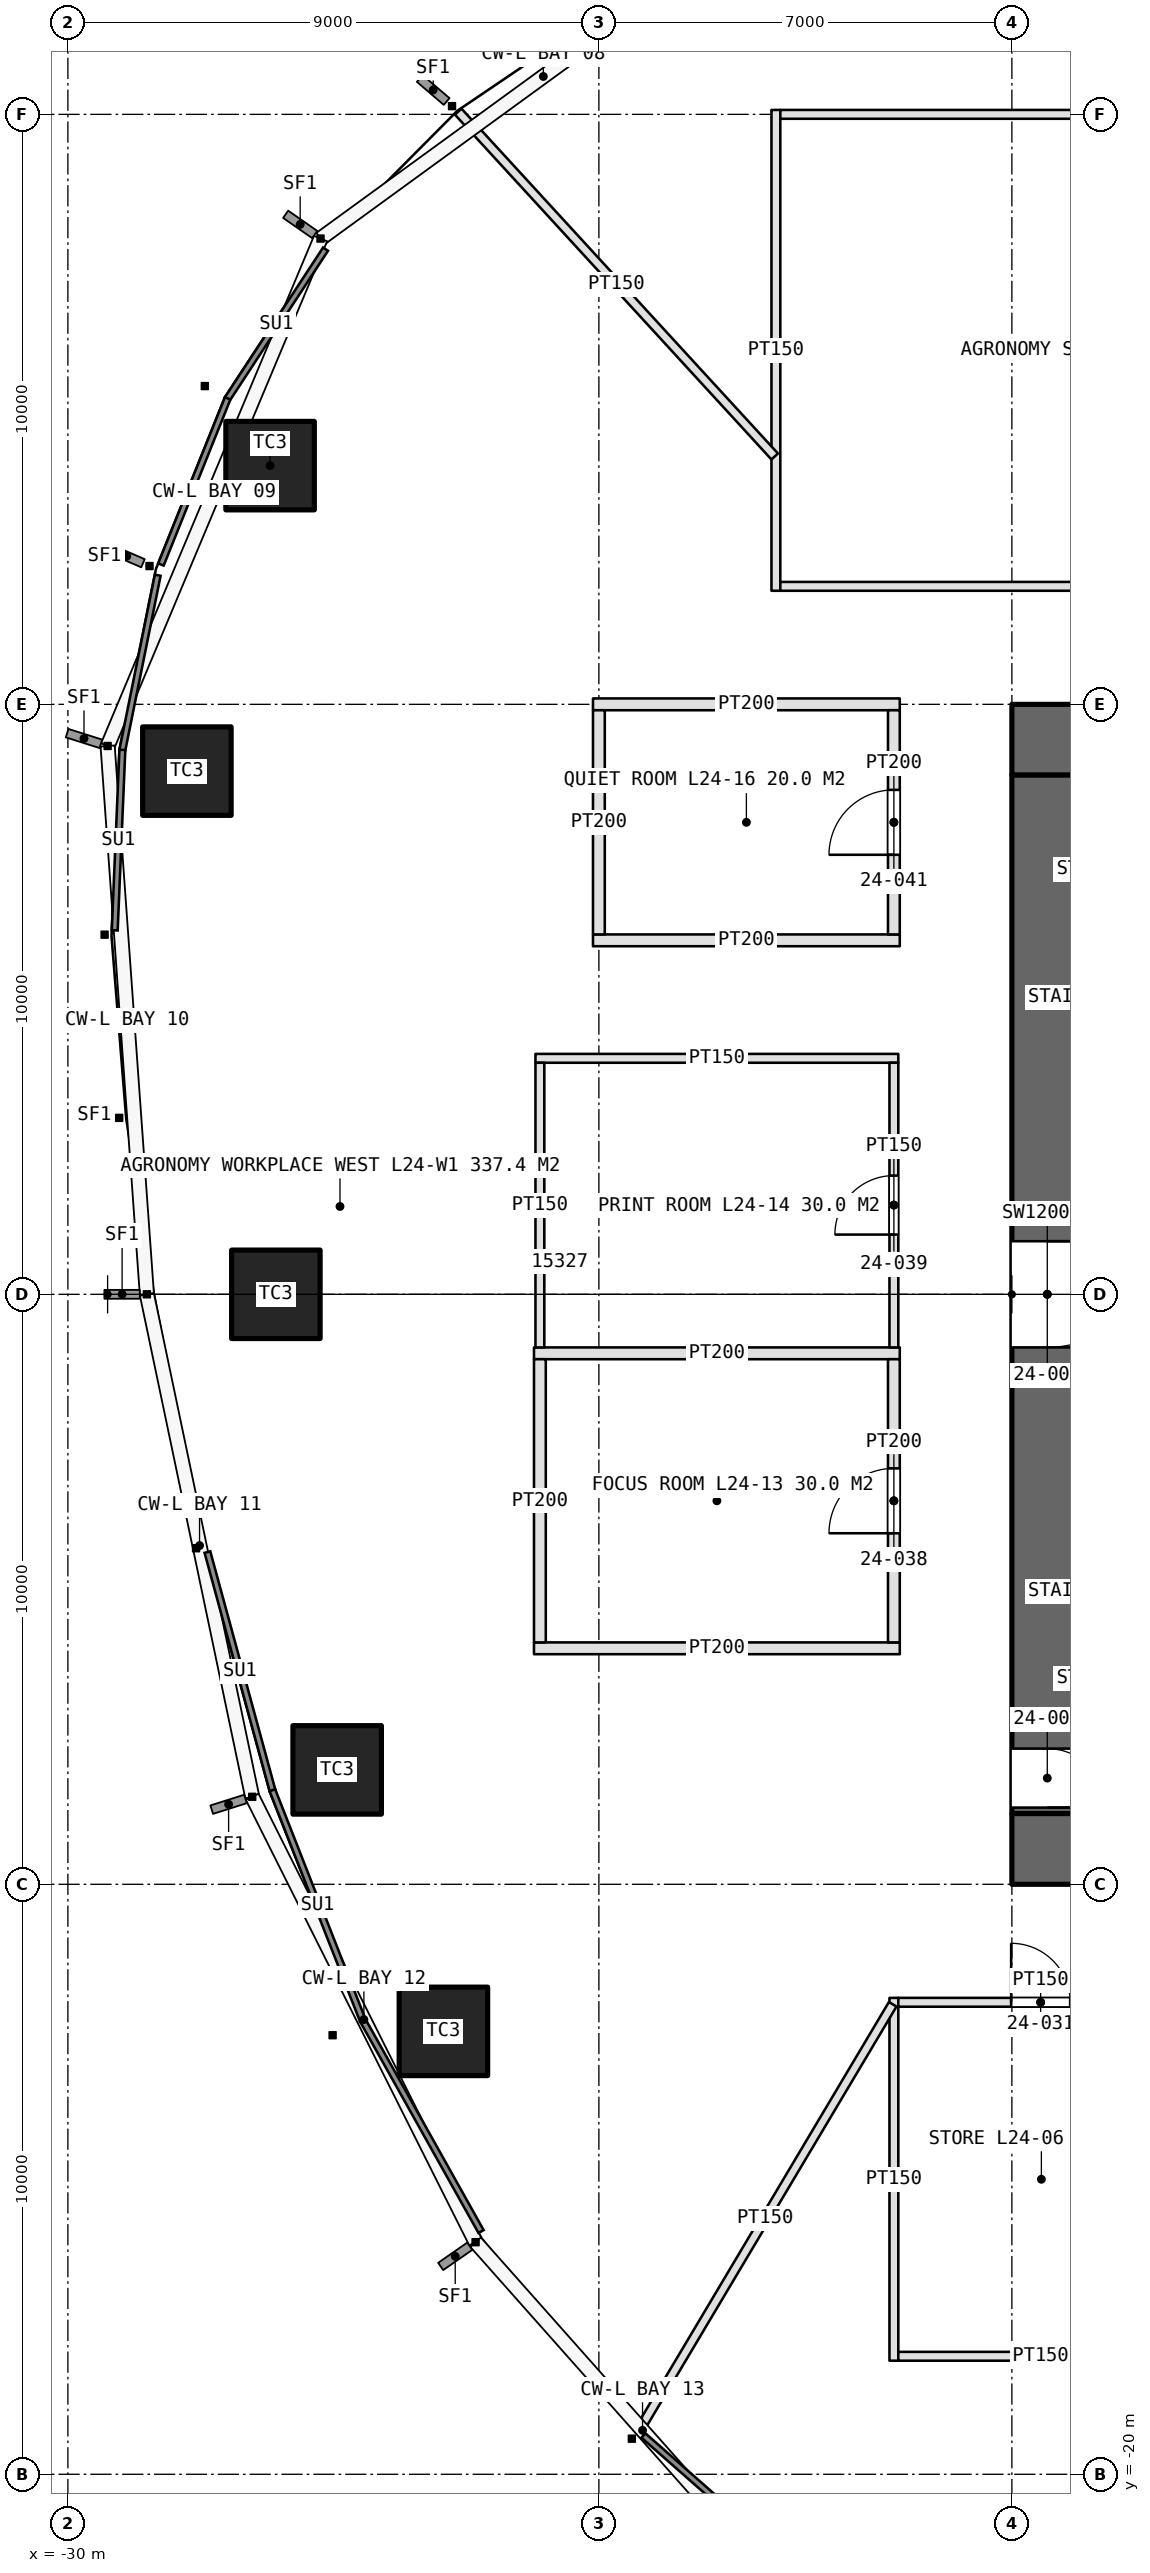
"""IFC4 building model, lengths in metres.
Left out: names, types, materials, properties, quantities, classifications, styles, units other than length and angle.
Written with IfcOpenShell. Run it as: python <this file> out.ifc"""

import sys

from ifc_helpers import new_model, si_unit, direction, frame, frame_2d, origin, origin_2d, place, context, subcontext, project, spatial, rectangle, extrude, element, fill, save


model = new_model("IFC4")
c1 = context("Model", 3, precision=1e-05, world=origin(), true_north=direction((0.0, 1.0)))
c2 = subcontext(c1, "Body", "Model", "MODEL_VIEW")
j1 = project(units=[si_unit("LENGTHUNIT", "METRE"), si_unit("PLANEANGLEUNIT", "RADIAN")], contexts=[c1])
p1 = place(None, origin())
s1 = spatial("IfcSite", under=j1, at=p1, CompositionType="ELEMENT")
p2 = place(p1, origin())
s2 = spatial("IfcBuilding", under=s1, at=p2, CompositionType="ELEMENT")
p3 = place(p2, frame((0.0, 0.0, 117.6)))
s3 = spatial("IfcBuildingStorey", under=s2, at=p3, CompositionType="ELEMENT", Elevation=117.6)
p4 = place(p3, frame((-14.0, -9.4, 0.0), z_axis=(0.0, 0.0, 1.0), x_axis=(1.0, 0.0, 0.0)))
e1 = element("IfcWall", 1, at=p4, inside=s3, PredefinedType="SHEAR", context=c2, shape_type="SweptSolid", body=[
    extrude(rectangle(XDim=28.0, YDim=1.2, at=frame_2d((14.0, 0.0))), origin(), (0.0, 0.0, 1.0), 4.2),
])
p5 = place(p4, frame((13.1, 0.0, 0.0)))
e2 = element("IfcOpeningElement", 2, at=p5, cuts=e1, PredefinedType="OPENING", context=c2, shape_type="SweptSolid", body=[
    extrude(rectangle(XDim=1.8, YDim=2.4, at=frame_2d((0.9, 1.2))), frame((0.0, 0.61, 0.0), z_axis=(0.0, -1.0, 0.0), x_axis=(1.0, 0.0, 0.0)), (0.0, 0.0, 1.0), 1.22),
])
p6 = place(p4, frame((22.9, 0.0, 0.0)))
e3 = element("IfcOpeningElement", 3, at=p6, cuts=e1, PredefinedType="OPENING", context=c2, shape_type="SweptSolid", body=[
    extrude(rectangle(XDim=2.2, YDim=2.7, at=frame_2d((1.1, 1.35))), frame((0.0, 0.61, 0.0), z_axis=(0.0, -1.0, 0.0), x_axis=(1.0, 0.0, 0.0)), (0.0, 0.0, 1.0), 1.22),
])
p7 = place(p3, frame((14.0, 9.4, 0.0), z_axis=(0.0, 0.0, 1.0), x_axis=(-1.0, 0.0, 0.0)))
e4 = element("IfcWall", 4, at=p7, inside=s3, PredefinedType="SHEAR", context=c2, shape_type="SweptSolid", body=[
    extrude(rectangle(XDim=28.0, YDim=1.2, at=frame_2d((14.0, 0.0))), origin(), (0.0, 0.0, 1.0), 4.2),
])
p8 = place(p7, frame((24.0, 0.0, 0.0)))
e5 = element("IfcOpeningElement", 5, at=p8, cuts=e4, PredefinedType="OPENING", context=c2, shape_type="SweptSolid", body=[
    extrude(rectangle(XDim=1.0, YDim=2.4, at=frame_2d((0.5, 1.2))), frame((0.0, 0.61, 0.0), z_axis=(0.0, -1.0, 0.0), x_axis=(1.0, 0.0, 0.0)), (0.0, 0.0, 1.0), 1.22),
])
p9 = place(p7, frame((13.1, 0.0, 0.0)))
e6 = element("IfcOpeningElement", 6, at=p9, cuts=e4, PredefinedType="OPENING", context=c2, shape_type="SweptSolid", body=[
    extrude(rectangle(XDim=1.8, YDim=2.4, at=frame_2d((0.9, 1.2))), frame((0.0, 0.61, 0.0), z_axis=(0.0, -1.0, 0.0), x_axis=(1.0, 0.0, 0.0)), (0.0, 0.0, 1.0), 1.22),
])
p10 = place(p3, frame((-13.4, 8.8, 0.0), z_axis=(0.0, 0.0, 1.0), x_axis=(0.0, -1.0, 0.0)))
e7 = element("IfcWall", 7, at=p10, inside=s3, PredefinedType="SHEAR", context=c2, shape_type="SweptSolid", body=[
    extrude(rectangle(XDim=17.6, YDim=1.2, at=frame_2d((8.8, 0.0))), origin(), (0.0, 0.0, 1.0), 4.2),
])
p11 = place(p10, frame((7.9, 0.0, 0.0)))
e8 = element("IfcOpeningElement", 8, at=p11, cuts=e7, PredefinedType="OPENING", context=c2, shape_type="SweptSolid", body=[
    extrude(rectangle(XDim=1.8, YDim=2.4, at=frame_2d((0.9, 1.2))), frame((0.0, 0.61, 0.0), z_axis=(0.0, -1.0, 0.0), x_axis=(1.0, 0.0, 0.0)), (0.0, 0.0, 1.0), 1.22),
])
p12 = place(p10, frame((16.5, 0.0, 0.0)))
e9 = element("IfcOpeningElement", 9, at=p12, cuts=e7, PredefinedType="OPENING", context=c2, shape_type="SweptSolid", body=[
    extrude(rectangle(XDim=1.0, YDim=2.4, at=frame_2d((0.5, 1.2))), frame((0.0, 0.61, 0.0), z_axis=(0.0, -1.0, 0.0), x_axis=(1.0, 0.0, 0.0)), (0.0, 0.0, 1.0), 1.22),
])
for number, where, z_axis, x_axis in (
    (10, (-26.573, 14.046, 0.0), (0.0, 0.0, 1.0), (1.0, 0.0, 0.0)),
    (11, (-27.983, 8.868, 0.0), (0.0, 0.0, 1.0), (1.0, 0.0, 0.0)),
    (12, (-26.475, 0.0, 0.0), (0.0, 0.0, 1.0), (1.0, 0.0, 0.0)),
    (13, (-25.436, -8.061, 0.0), (0.0, 0.0, 1.0), (1.0, 0.0, 0.0)),
    (14, (-23.635, -12.493, 0.0), (0.0, 0.0, 1.0), (1.0, 0.0, 0.0)),
):
    element("IfcColumn", number, at=place(p3, frame(where, z_axis=z_axis, x_axis=x_axis)), inside=s3, PredefinedType="COLUMN", context=c2, shape_type="SweptSolid", body=[
        extrude(rectangle(XDim=1.5, YDim=1.5, at=origin_2d()), origin(), (0.0, 0.0, 1.0), 4.2),
    ])
p13 = place(p3, frame((-18.0, 11.925, 0.0), z_axis=(0.0, 0.0, 1.0), x_axis=(0.0, 1.0, 0.0)))
e15 = element("IfcWall", 15, at=p13, inside=s3, PredefinedType="PARTITIONING", context=c2, shape_type="SweptSolid", body=[
    extrude(rectangle(XDim=8.15, YDim=0.15, at=frame_2d((4.075, 0.0))), origin(), (0.0, 0.0, 1.0), 3.0),
])
p14 = place(p3, frame((-17.925, 12.0, 0.0), z_axis=(0.0, 0.0, 1.0), x_axis=(1.0, 0.0, 0.0)))
e16 = element("IfcWall", 16, at=p14, inside=s3, PredefinedType="PARTITIONING", context=c2, shape_type="SweptSolid", body=[
    extrude(rectangle(XDim=11.85, YDim=0.15, at=frame_2d((5.925, 0.0))), origin(), (0.0, 0.0, 1.0), 3.0),
])
p15 = place(p14, frame((5.325, 0.0, 0.0)))
e17 = element("IfcOpeningElement", 17, at=p15, cuts=e16, PredefinedType="OPENING", context=c2, shape_type="SweptSolid", body=[
    extrude(rectangle(XDim=1.2, YDim=2.4, at=frame_2d((0.6, 1.2))), frame((0.0, 0.085, 0.0), z_axis=(0.0, -1.0, 0.0), x_axis=(1.0, 0.0, 0.0)), (0.0, 0.0, 1.0), 0.17),
])
p16 = place(p3, frame((-17.925, 20.0, 0.0), z_axis=(0.0, 0.0, 1.0), x_axis=(1.0, 0.0, 0.0)))
e18 = element("IfcWall", 18, at=p16, inside=s3, PredefinedType="PARTITIONING", context=c2, shape_type="SweptSolid", body=[
    extrude(rectangle(XDim=11.85, YDim=0.15, at=frame_2d((5.925, 0.0))), origin(), (0.0, 0.0, 1.0), 3.0),
])
p17 = place(p3, frame((-16.0, -11.925, 0.0), z_axis=(0.0, 0.0, 1.0), x_axis=(0.0, -1.0, 0.0)))
e19 = element("IfcWall", 19, at=p17, inside=s3, PredefinedType="PARTITIONING", context=c2, shape_type="SweptSolid", body=[
    extrude(rectangle(XDim=6.15, YDim=0.15, at=frame_2d((3.075, 0.0))), origin(), (0.0, 0.0, 1.0), 3.0),
])
p18 = place(p3, frame((-15.925, -12.0, 0.0), z_axis=(0.0, 0.0, 1.0), x_axis=(1.0, 0.0, 0.0)))
e20 = element("IfcWall", 20, at=p18, inside=s3, PredefinedType="PARTITIONING", context=c2, shape_type="SweptSolid", body=[
    extrude(rectangle(XDim=4.825, YDim=0.15, at=frame_2d((2.413, 0.0))), origin(), (0.0, 0.0, 1.0), 3.0),
])
p19 = place(p18, frame((1.913, 0.0, 0.0)))
e21 = element("IfcOpeningElement", 21, at=p19, cuts=e20, PredefinedType="OPENING", context=c2, shape_type="SweptSolid", body=[
    extrude(rectangle(XDim=1.0, YDim=2.2, at=frame_2d((0.5, 1.1))), frame((0.0, 0.085, 0.0), z_axis=(0.0, -1.0, 0.0), x_axis=(1.0, 0.0, 0.0)), (0.0, 0.0, 1.0), 0.17),
])
p20 = place(p3, frame((-15.925, -18.0, 0.0), z_axis=(0.0, 0.0, 1.0), x_axis=(1.0, 0.0, 0.0)))
e22 = element("IfcWall", 22, at=p20, inside=s3, PredefinedType="PARTITIONING", context=c2, shape_type="SweptSolid", body=[
    extrude(rectangle(XDim=4.825, YDim=0.15, at=frame_2d((2.413, 0.0))), origin(), (0.0, 0.0, 1.0), 3.0),
])
for number, where, z_axis, x_axis in (
    (23, (-15.9, -6.0, 0.0), (0.0, 0.0, 1.0), (-1.0, 0.0, 0.0)),
    (24, (-15.9, -1.0, 0.0), (0.0, 0.0, 1.0), (-1.0, 0.0, 0.0)),
):
    element("IfcWall", number, at=place(p3, frame(where, z_axis=z_axis, x_axis=x_axis)), inside=s3, PredefinedType="PARTITIONING", context=c2, shape_type="SweptSolid", body=[
        extrude(rectangle(XDim=6.2, YDim=0.2, at=frame_2d((3.1, 0.0))), origin(), (0.0, 0.0, 1.0), 3.0),
    ])
p21 = place(p3, frame((-15.925, 4.0, 0.0), z_axis=(0.0, 0.0, 1.0), x_axis=(-1.0, 0.0, 0.0)))
e25 = element("IfcWall", 25, at=p21, inside=s3, PredefinedType="PARTITIONING", context=c2, shape_type="SweptSolid", body=[
    extrude(rectangle(XDim=6.15, YDim=0.15, at=frame_2d((3.075, 0.0))), origin(), (0.0, 0.0, 1.0), 3.0),
])
p22 = place(p3, frame((-16.0, -5.9, 0.0), z_axis=(0.0, 0.0, 1.0), x_axis=(0.0, 1.0, 0.0)))
e26 = element("IfcWall", 26, at=p22, inside=s3, PredefinedType="PARTITIONING", context=c2, shape_type="SweptSolid", body=[
    extrude(rectangle(XDim=4.8, YDim=0.2, at=frame_2d((2.4, 0.0))), origin(), (0.0, 0.0, 1.0), 3.0),
])
p23 = place(p22, frame((1.85, 0.0, 0.0)))
e27 = element("IfcOpeningElement", 27, at=p23, cuts=e26, PredefinedType="OPENING", context=c2, shape_type="SweptSolid", body=[
    extrude(rectangle(XDim=1.1, YDim=2.3, at=frame_2d((0.55, 1.15))), frame((0.0, 0.11, 0.0), z_axis=(0.0, -1.0, 0.0), x_axis=(1.0, 0.0, 0.0)), (0.0, 0.0, 1.0), 0.22),
])
p24 = place(p3, frame((-22.0, -5.9, 0.0), z_axis=(0.0, 0.0, 1.0), x_axis=(0.0, 1.0, 0.0)))
e28 = element("IfcWall", 28, at=p24, inside=s3, PredefinedType="PARTITIONING", context=c2, shape_type="SweptSolid", body=[
    extrude(rectangle(XDim=4.8, YDim=0.2, at=frame_2d((2.4, 0.0))), origin(), (0.0, 0.0, 1.0), 3.0),
])
p25 = place(p3, frame((-16.0, -0.9, 0.0), z_axis=(0.0, 0.0, 1.0), x_axis=(0.0, 1.0, 0.0)))
e29 = element("IfcWall", 29, at=p25, inside=s3, PredefinedType="PARTITIONING", context=c2, shape_type="SweptSolid", body=[
    extrude(rectangle(XDim=4.825, YDim=0.15, at=frame_2d((2.413, 0.0))), origin(), (0.0, 0.0, 1.0), 3.0),
])
p26 = place(p25, frame((1.913, 0.0, 0.0)))
e30 = element("IfcOpeningElement", 30, at=p26, cuts=e29, PredefinedType="OPENING", context=c2, shape_type="SweptSolid", body=[
    extrude(rectangle(XDim=1.0, YDim=2.2, at=frame_2d((0.5, 1.1))), frame((0.0, 0.085, 0.0), z_axis=(0.0, -1.0, 0.0), x_axis=(1.0, 0.0, 0.0)), (0.0, 0.0, 1.0), 0.17),
])
p27 = place(p3, frame((-22.0, -0.9, 0.0), z_axis=(0.0, 0.0, 1.0), x_axis=(0.0, 1.0, 0.0)))
e31 = element("IfcWall", 31, at=p27, inside=s3, PredefinedType="PARTITIONING", context=c2, shape_type="SweptSolid", body=[
    extrude(rectangle(XDim=4.825, YDim=0.15, at=frame_2d((2.413, 0.0))), origin(), (0.0, 0.0, 1.0), 3.0),
])
for number, where, z_axis, x_axis in (
    (32, (-15.9, 6.0, 0.0), (0.0, 0.0, 1.0), (-1.0, 0.0, 0.0)),
    (33, (-15.9, 10.0, 0.0), (0.0, 0.0, 1.0), (-1.0, 0.0, 0.0)),
):
    element("IfcWall", number, at=place(p3, frame(where, z_axis=z_axis, x_axis=x_axis)), inside=s3, PredefinedType="PARTITIONING", context=c2, shape_type="SweptSolid", body=[
        extrude(rectangle(XDim=5.2, YDim=0.2, at=frame_2d((2.6, 0.0))), origin(), (0.0, 0.0, 1.0), 3.0),
    ])
p28 = place(p3, frame((-16.0, 6.1, 0.0), z_axis=(0.0, 0.0, 1.0), x_axis=(0.0, 1.0, 0.0)))
e34 = element("IfcWall", 34, at=p28, inside=s3, PredefinedType="PARTITIONING", context=c2, shape_type="SweptSolid", body=[
    extrude(rectangle(XDim=3.8, YDim=0.2, at=frame_2d((1.9, 0.0))), origin(), (0.0, 0.0, 1.0), 3.0),
])
p29 = place(p28, frame((1.35, 0.0, 0.0)))
e35 = element("IfcOpeningElement", 35, at=p29, cuts=e34, PredefinedType="OPENING", context=c2, shape_type="SweptSolid", body=[
    extrude(rectangle(XDim=1.1, YDim=2.3, at=frame_2d((0.55, 1.15))), frame((0.0, 0.11, 0.0), z_axis=(0.0, -1.0, 0.0), x_axis=(1.0, 0.0, 0.0)), (0.0, 0.0, 1.0), 0.22),
])
p30 = place(p3, frame((-21.0, 6.1, 0.0), z_axis=(0.0, 0.0, 1.0), x_axis=(0.0, 1.0, 0.0)))
e36 = element("IfcWall", 36, at=p30, inside=s3, PredefinedType="PARTITIONING", context=c2, shape_type="SweptSolid", body=[
    extrude(rectangle(XDim=3.8, YDim=0.2, at=frame_2d((1.9, 0.0))), origin(), (0.0, 0.0, 1.0), 3.0),
])
p31 = place(p3, frame((-16.02, -12.034, 0.0), z_axis=(0.0, 0.0, 1.0), x_axis=(-0.511518902153, -0.859272024879, 0.0)))
e37 = element("IfcWall", 37, at=p31, inside=s3, PredefinedType="PARTITIONING", context=c2, shape_type="SweptSolid", body=[
    extrude(rectangle(XDim=8.451, YDim=0.15, at=frame_2d((4.226, 0.0))), origin(), (0.0, 0.0, 1.0), 3.0),
])
p32 = place(p3, frame((-18.02, 14.201, 0.0), z_axis=(0.0, 0.0, 1.0), x_axis=(-0.676162058246, 0.736752923977, 0.0)))
e38 = element("IfcWall", 38, at=p32, inside=s3, PredefinedType="PARTITIONING", context=c2, shape_type="SweptSolid", body=[
    extrude(rectangle(XDim=7.934, YDim=0.15, at=frame_2d((3.967, 0.0))), origin(), (0.0, 0.0, 1.0), 3.0),
])
p33 = place(p11, origin())
e39 = element("IfcDoor", 39, at=p33, inside=s3, OperationType="DOUBLE_DOOR_SINGLE_SWING", PredefinedType="DOOR", context=c2, shape_type="SweptSolid", body=[
    extrude(rectangle(XDim=1.8, YDim=2.4, at=frame_2d((0.9, 1.2))), frame((0.0, 0.025, 0.0), z_axis=(0.0, -1.0, 0.0), x_axis=(1.0, 0.0, 0.0)), (0.0, 0.0, 1.0), 0.05),
])
fill(e8, e39)
p34 = place(p12, origin())
e40 = element("IfcDoor", 40, at=p34, inside=s3, OperationType="SINGLE_SWING_RIGHT", PredefinedType="DOOR", context=c2, shape_type="SweptSolid", body=[
    extrude(rectangle(XDim=1.0, YDim=2.4, at=frame_2d((0.5, 1.2))), frame((0.0, 0.025, 0.0), z_axis=(0.0, -1.0, 0.0), x_axis=(1.0, 0.0, 0.0)), (0.0, 0.0, 1.0), 0.05),
])
fill(e9, e40)
p35 = place(p19, origin())
e41 = element("IfcDoor", 41, at=p35, inside=s3, OperationType="SINGLE_SWING_LEFT", PredefinedType="DOOR", context=c2, shape_type="SweptSolid", body=[
    extrude(rectangle(XDim=1.0, YDim=2.2, at=frame_2d((0.5, 1.1))), frame((0.0, 0.025, 0.0), z_axis=(0.0, -1.0, 0.0), x_axis=(1.0, 0.0, 0.0)), (0.0, 0.0, 1.0), 0.05),
])
fill(e21, e41)
p36 = place(p23, origin())
e42 = element("IfcDoor", 42, at=p36, inside=s3, OperationType="SINGLE_SWING_LEFT", PredefinedType="DOOR", context=c2, shape_type="SweptSolid", body=[
    extrude(rectangle(XDim=1.1, YDim=2.3, at=frame_2d((0.55, 1.15))), frame((0.0, 0.025, 0.0), z_axis=(0.0, -1.0, 0.0), x_axis=(1.0, 0.0, 0.0)), (0.0, 0.0, 1.0), 0.05),
])
fill(e27, e42)
p37 = place(p26, origin())
e43 = element("IfcDoor", 43, at=p37, inside=s3, OperationType="SINGLE_SWING_LEFT", PredefinedType="DOOR", context=c2, shape_type="SweptSolid", body=[
    extrude(rectangle(XDim=1.0, YDim=2.2, at=frame_2d((0.5, 1.1))), frame((0.0, 0.025, 0.0), z_axis=(0.0, -1.0, 0.0), x_axis=(1.0, 0.0, 0.0)), (0.0, 0.0, 1.0), 0.05),
])
fill(e30, e43)
p38 = place(p29, origin())
e44 = element("IfcDoor", 44, at=p38, inside=s3, OperationType="SINGLE_SWING_LEFT", PredefinedType="DOOR", context=c2, shape_type="SweptSolid", body=[
    extrude(rectangle(XDim=1.1, YDim=2.3, at=frame_2d((0.55, 1.15))), frame((0.0, 0.025, 0.0), z_axis=(0.0, -1.0, 0.0), x_axis=(1.0, 0.0, 0.0)), (0.0, 0.0, 1.0), 0.05),
])
fill(e35, e44)
save(model, sys.argv[1])
